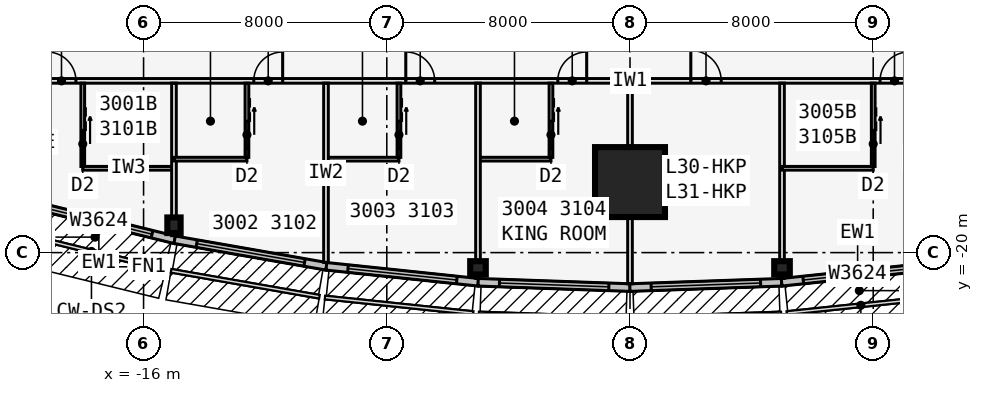
"""IFC4 building model, lengths in metres.
Left out: names, types, materials, properties, quantities, classifications, styles, units other than length and angle.
Written with IfcOpenShell. Run it as: python <this file> out.ifc"""

import sys

from ifc_helpers import new_model, si_unit, direction, frame, frame_2d, origin, origin_2d, place, context, subcontext, project, spatial, rectangle, i_section, extrude, element, fill, save


model = new_model("IFC4")
c1 = context("Model", 3, precision=1e-05, world=origin(), true_north=direction((0.0, 1.0)))
c2 = subcontext(c1, "Body", "Model", "MODEL_VIEW")
j1 = project(units=[si_unit("LENGTHUNIT", "METRE"), si_unit("PLANEANGLEUNIT", "RADIAN")], contexts=[c1])
p1 = place(None, origin())
s1 = spatial("IfcSite", under=j1, at=p1, CompositionType="ELEMENT")
p2 = place(p1, origin())
s2 = spatial("IfcBuilding", under=s1, at=p2, CompositionType="ELEMENT")
p3 = place(p2, frame((0.0, 0.0, 118.1)))
s3 = spatial("IfcBuildingStorey", under=s2, at=p3, CompositionType="ELEMENT", Elevation=118.1)
for number, where, z_axis, x_axis in (
    (1, (-15.0, -19.1, 0.0), (0.0, 0.0, 1.0), (1.0, 0.0, 0.0)),
    (2, (-5.0, -20.5, 0.0), (0.0, 0.0, 1.0), (0.0, -1.0, 0.0)),
    (3, (5.0, -20.5, 0.0), (0.0, 0.0, 1.0), (0.0, -1.0, 0.0)),
):
    element("IfcColumn", number, at=place(p3, frame(where, z_axis=z_axis, x_axis=x_axis)), inside=s3, PredefinedType="COLUMN", context=c2, shape_type="SweptSolid", body=[
        extrude(i_section(OverallWidth=0.437, OverallDepth=0.513, WebThickness=0.061, FlangeThickness=0.097, at=origin_2d()), origin(), (0.0, 0.0, 1.0), 3.4),
    ])
p4 = place(p3, frame((0.0, -17.68, 0.0), z_axis=(0.0, 0.0, 1.0), x_axis=(0.0, -1.0, 0.0)))
e4 = element("IfcColumn", 4, at=p4, inside=s3, PredefinedType="COLUMN", context=c2, shape_type="SweptSolid", body=[
    extrude(rectangle(XDim=2.3, YDim=2.3, at=origin_2d()), origin(), (0.0, 0.0, 1.0), 3.4),
])
p5 = place(p3, frame((-19.97, -18.354, 0.0), z_axis=(0.0, 0.0, 1.0), x_axis=(0.971270024053, -0.237980126011, 0.0)))
e5 = element("IfcWall", 5, at=p5, inside=s3, PredefinedType="STANDARD", context=c2, shape_type="SweptSolid", body=[
    extrude(rectangle(XDim=5.148, YDim=0.25, at=frame_2d((2.574, 0.0))), origin(), (0.0, 0.0, 1.0), 3.235),
])
p6 = place(p5, frame((0.774, 0.0, 0.45)))
e6 = element("IfcOpeningElement", 6, at=p6, cuts=e5, PredefinedType="OPENING", context=c2, shape_type="SweptSolid", body=[
    extrude(rectangle(XDim=3.6, YDim=2.4, at=frame_2d((1.8, 1.2))), frame((0.0, 0.135, 0.0), z_axis=(0.0, -1.0, 0.0), x_axis=(1.0, 0.0, 0.0)), (0.0, 0.0, 1.0), 0.27),
])
p7 = place(p3, frame((-14.979, -19.577, 0.0), z_axis=(0.0, 0.0, 1.0), x_axis=(0.985030467156, -0.172380331752, 0.0)))
e7 = element("IfcWall", 7, at=p7, inside=s3, PredefinedType="STANDARD", context=c2, shape_type="SweptSolid", body=[
    extrude(rectangle(XDim=5.076, YDim=0.25, at=frame_2d((2.538, 0.0))), origin(), (0.0, 0.0, 1.0), 3.235),
])
p8 = place(p7, frame((0.738, 0.0, 0.45)))
e8 = element("IfcOpeningElement", 8, at=p8, cuts=e7, PredefinedType="OPENING", context=c2, shape_type="SweptSolid", body=[
    extrude(rectangle(XDim=3.6, YDim=2.4, at=frame_2d((1.8, 1.2))), frame((0.0, 0.135, 0.0), z_axis=(0.0, -1.0, 0.0), x_axis=(1.0, 0.0, 0.0)), (0.0, 0.0, 1.0), 0.27),
])
p9 = place(p3, frame((-9.987, -20.451, 0.0), z_axis=(0.0, 0.0, 1.0), x_axis=(0.994534683851, -0.104406717299, 0.0)))
e9 = element("IfcWall", 9, at=p9, inside=s3, PredefinedType="STANDARD", context=c2, shape_type="SweptSolid", body=[
    extrude(rectangle(XDim=5.028, YDim=0.25, at=frame_2d((2.514, 0.0))), origin(), (0.0, 0.0, 1.0), 3.235),
])
p10 = place(p9, frame((0.714, 0.0, 0.45)))
e10 = element("IfcOpeningElement", 10, at=p10, cuts=e9, PredefinedType="OPENING", context=c2, shape_type="SweptSolid", body=[
    extrude(rectangle(XDim=3.6, YDim=2.4, at=frame_2d((1.8, 1.2))), frame((0.0, 0.135, 0.0), z_axis=(0.0, -1.0, 0.0), x_axis=(1.0, 0.0, 0.0)), (0.0, 0.0, 1.0), 0.27),
])
p11 = place(p3, frame((-4.996, -20.975, 0.0), z_axis=(0.0, 0.0, 1.0), x_axis=(0.999387720943, -0.034988329879, 0.0)))
e11 = element("IfcWall", 11, at=p11, inside=s3, PredefinedType="STANDARD", context=c2, shape_type="SweptSolid", body=[
    extrude(rectangle(XDim=5.003, YDim=0.25, at=frame_2d((2.501, 0.0))), origin(), (0.0, 0.0, 1.0), 3.235),
])
p12 = place(p11, frame((0.701, 0.0, 0.45)))
e12 = element("IfcOpeningElement", 12, at=p12, cuts=e11, PredefinedType="OPENING", context=c2, shape_type="SweptSolid", body=[
    extrude(rectangle(XDim=3.6, YDim=2.4, at=frame_2d((1.8, 1.2))), frame((0.0, 0.135, 0.0), z_axis=(0.0, -1.0, 0.0), x_axis=(1.0, 0.0, 0.0)), (0.0, 0.0, 1.0), 0.27),
])
p13 = place(p3, frame((-0.004, -21.15, 0.0), z_axis=(0.0, 0.0, 1.0), x_axis=(0.999387720943, 0.034988329879, 0.0)))
e13 = element("IfcWall", 13, at=p13, inside=s3, PredefinedType="STANDARD", context=c2, shape_type="SweptSolid", body=[
    extrude(rectangle(XDim=5.003, YDim=0.25, at=frame_2d((2.501, 0.0))), origin(), (0.0, 0.0, 1.0), 3.235),
])
p14 = place(p13, frame((0.701, 0.0, 0.45)))
e14 = element("IfcOpeningElement", 14, at=p14, cuts=e13, PredefinedType="OPENING", context=c2, shape_type="SweptSolid", body=[
    extrude(rectangle(XDim=3.6, YDim=2.4, at=frame_2d((1.8, 1.2))), frame((0.0, 0.135, 0.0), z_axis=(0.0, -1.0, 0.0), x_axis=(1.0, 0.0, 0.0)), (0.0, 0.0, 1.0), 0.27),
])
p15 = place(p3, frame((4.987, -20.976, 0.0), z_axis=(0.0, 0.0, 1.0), x_axis=(0.994534683851, 0.104406717299, 0.0)))
e15 = element("IfcWall", 15, at=p15, inside=s3, PredefinedType="STANDARD", context=c2, shape_type="SweptSolid", body=[
    extrude(rectangle(XDim=5.028, YDim=0.25, at=frame_2d((2.514, 0.0))), origin(), (0.0, 0.0, 1.0), 3.235),
])
p16 = place(p15, frame((0.714, 0.0, 0.45)))
e16 = element("IfcOpeningElement", 16, at=p16, cuts=e15, PredefinedType="OPENING", context=c2, shape_type="SweptSolid", body=[
    extrude(rectangle(XDim=3.6, YDim=2.4, at=frame_2d((1.8, 1.2))), frame((0.0, 0.135, 0.0), z_axis=(0.0, -1.0, 0.0), x_axis=(1.0, 0.0, 0.0)), (0.0, 0.0, 1.0), 0.27),
])
p17 = place(p3, frame((-23.857, -14.351, 0.0), z_axis=(0.0, 0.0, 1.0), x_axis=(1.0, 0.0, 0.0)))
e17 = element("IfcWall", 17, at=p17, inside=s3, PredefinedType="PARTITIONING", context=c2, shape_type="SweptSolid", body=[
    extrude(rectangle(XDim=47.714, YDim=0.15, at=frame_2d((23.857, 0.0))), origin(), (0.0, 0.0, 1.0), 3.235),
])
p18 = place(p17, frame((4.682, 0.0, 0.0)))
e18 = element("IfcOpeningElement", 18, at=p18, cuts=e17, PredefinedType="OPENING", context=c2, shape_type="SweptSolid", body=[
    extrude(rectangle(XDim=0.95, YDim=2.13, at=frame_2d((0.475, 1.065))), frame((0.0, 0.085, 0.0), z_axis=(0.0, -1.0, 0.0), x_axis=(1.0, 0.0, 0.0)), (0.0, 0.0, 1.0), 0.17),
])
p19 = place(p17, frame((11.482, 0.0, 0.0)))
e19 = element("IfcOpeningElement", 19, at=p19, cuts=e17, PredefinedType="OPENING", context=c2, shape_type="SweptSolid", body=[
    extrude(rectangle(XDim=0.95, YDim=2.13, at=frame_2d((0.475, 1.065))), frame((0.0, 0.085, 0.0), z_axis=(0.0, -1.0, 0.0), x_axis=(1.0, 0.0, 0.0)), (0.0, 0.0, 1.0), 0.17),
])
p20 = place(p17, frame((16.482, 0.0, 0.0)))
e20 = element("IfcOpeningElement", 20, at=p20, cuts=e17, PredefinedType="OPENING", context=c2, shape_type="SweptSolid", body=[
    extrude(rectangle(XDim=0.95, YDim=2.13, at=frame_2d((0.475, 1.065))), frame((0.0, 0.085, 0.0), z_axis=(0.0, -1.0, 0.0), x_axis=(1.0, 0.0, 0.0)), (0.0, 0.0, 1.0), 0.17),
])
p21 = place(p17, frame((21.482, 0.0, 0.0)))
e21 = element("IfcOpeningElement", 21, at=p21, cuts=e17, PredefinedType="OPENING", context=c2, shape_type="SweptSolid", body=[
    extrude(rectangle(XDim=0.95, YDim=2.13, at=frame_2d((0.475, 1.065))), frame((0.0, 0.085, 0.0), z_axis=(0.0, -1.0, 0.0), x_axis=(1.0, 0.0, 0.0)), (0.0, 0.0, 1.0), 0.17),
])
p22 = place(p17, frame((25.857, 0.0, 0.0)))
e22 = element("IfcOpeningElement", 22, at=p22, cuts=e17, PredefinedType="OPENING", context=c2, shape_type="SweptSolid", body=[
    extrude(rectangle(XDim=1.0, YDim=2.13, at=frame_2d((0.5, 1.065))), frame((0.0, 0.085, 0.0), z_axis=(0.0, -1.0, 0.0), x_axis=(1.0, 0.0, 0.0)), (0.0, 0.0, 1.0), 0.17),
])
p23 = place(p17, frame((32.082, 0.0, 0.0)))
e23 = element("IfcOpeningElement", 23, at=p23, cuts=e17, PredefinedType="OPENING", context=c2, shape_type="SweptSolid", body=[
    extrude(rectangle(XDim=0.95, YDim=2.13, at=frame_2d((0.475, 1.065))), frame((0.0, 0.085, 0.0), z_axis=(0.0, -1.0, 0.0), x_axis=(1.0, 0.0, 0.0)), (0.0, 0.0, 1.0), 0.17),
])
p24 = place(p17, frame((42.082, 0.0, 0.0)))
e24 = element("IfcOpeningElement", 24, at=p24, cuts=e17, PredefinedType="OPENING", context=c2, shape_type="SweptSolid", body=[
    extrude(rectangle(XDim=0.95, YDim=2.13, at=frame_2d((0.475, 1.065))), frame((0.0, 0.085, 0.0), z_axis=(0.0, -1.0, 0.0), x_axis=(1.0, 0.0, 0.0)), (0.0, 0.0, 1.0), 0.17),
])
p25 = place(p3, frame((-15.0, -14.426, 0.0), z_axis=(0.0, 0.0, 1.0), x_axis=(0.0, -1.0, 0.0)))
e25 = element("IfcWall", 25, at=p25, inside=s3, PredefinedType="PARTITIONING", context=c2, shape_type="SweptSolid", body=[
    extrude(rectangle(XDim=5.017, YDim=0.15, at=frame_2d((2.508, 0.0))), origin(), (0.0, 0.0, 1.0), 2.389),
])
p26 = place(p3, frame((-10.0, -14.426, 0.0), z_axis=(0.0, 0.0, 1.0), x_axis=(0.0, -1.0, 0.0)))
e26 = element("IfcWall", 26, at=p26, inside=s3, PredefinedType="PARTITIONING", context=c2, shape_type="SweptSolid", body=[
    extrude(rectangle(XDim=5.895, YDim=0.15, at=frame_2d((2.948, 0.0))), origin(), (0.0, 0.0, 1.0), 2.389),
])
p27 = place(p3, frame((-5.0, -14.426, 0.0), z_axis=(0.0, 0.0, 1.0), x_axis=(0.0, -1.0, 0.0)))
e27 = element("IfcWall", 27, at=p27, inside=s3, PredefinedType="PARTITIONING", context=c2, shape_type="SweptSolid", body=[
    extrude(rectangle(XDim=6.423, YDim=0.15, at=frame_2d((3.211, 0.0))), origin(), (0.0, 0.0, 1.0), 2.389),
])
p28 = place(p3, frame((0.0, -14.426, 0.0), z_axis=(0.0, 0.0, 1.0), x_axis=(0.0, -1.0, 0.0)))
e28 = element("IfcWall", 28, at=p28, inside=s3, PredefinedType="PARTITIONING", context=c2, shape_type="SweptSolid", body=[
    extrude(rectangle(XDim=6.599, YDim=0.15, at=frame_2d((3.299, 0.0))), origin(), (0.0, 0.0, 1.0), 2.389),
])
p29 = place(p3, frame((5.0, -14.426, 0.0), z_axis=(0.0, 0.0, 1.0), x_axis=(0.0, -1.0, 0.0)))
e29 = element("IfcWall", 29, at=p29, inside=s3, PredefinedType="PARTITIONING", context=c2, shape_type="SweptSolid", body=[
    extrude(rectangle(XDim=6.423, YDim=0.15, at=frame_2d((3.211, 0.0))), origin(), (0.0, 0.0, 1.0), 2.389),
])
p30 = place(p3, frame((-18.0, -17.226, 0.0), z_axis=(0.0, 0.0, 1.0), x_axis=(1.0, 0.0, 0.0)))
e30 = element("IfcWall", 30, at=p30, inside=s3, PredefinedType="PLUMBINGWALL", context=c2, shape_type="SweptSolid", body=[
    extrude(rectangle(XDim=3.0, YDim=0.12, at=frame_2d((1.5, 0.0))), origin(), (0.0, 0.0, 1.0), 3.235),
])
p31 = place(p3, frame((-18.0, -14.426, 0.0), z_axis=(0.0, 0.0, 1.0), x_axis=(0.0, -1.0, 0.0)))
e31 = element("IfcWall", 31, at=p31, inside=s3, PredefinedType="PLUMBINGWALL", context=c2, shape_type="SweptSolid", body=[
    extrude(rectangle(XDim=2.74, YDim=0.12, at=frame_2d((1.37, 0.0))), origin(), (0.0, 0.0, 1.0), 3.235),
])
p32 = place(p31, frame((1.55, 0.0, 0.0)))
e32 = element("IfcOpeningElement", 32, at=p32, cuts=e31, PredefinedType="OPENING", context=c2, shape_type="SweptSolid", body=[
    extrude(rectangle(XDim=0.9, YDim=2.13, at=frame_2d((0.45, 1.065))), frame((0.0, 0.07, 0.0), z_axis=(0.0, -1.0, 0.0), x_axis=(1.0, 0.0, 0.0)), (0.0, 0.0, 1.0), 0.14),
])
p33 = place(p3, frame((-15.0, -16.926, 0.0), z_axis=(0.0, 0.0, 1.0), x_axis=(1.0, 0.0, 0.0)))
e33 = element("IfcWall", 33, at=p33, inside=s3, PredefinedType="PLUMBINGWALL", context=c2, shape_type="SweptSolid", body=[
    extrude(rectangle(XDim=2.4, YDim=0.12, at=frame_2d((1.2, 0.0))), origin(), (0.0, 0.0, 1.0), 3.235),
])
p34 = place(p3, frame((-12.6, -14.426, 0.0), z_axis=(0.0, 0.0, 1.0), x_axis=(0.0, -1.0, 0.0)))
e34 = element("IfcWall", 34, at=p34, inside=s3, PredefinedType="PLUMBINGWALL", context=c2, shape_type="SweptSolid", body=[
    extrude(rectangle(XDim=2.44, YDim=0.12, at=frame_2d((1.22, 0.0))), origin(), (0.0, 0.0, 1.0), 3.235),
])
p35 = place(p34, frame((1.25, 0.0, 0.0)))
e35 = element("IfcOpeningElement", 35, at=p35, cuts=e34, PredefinedType="OPENING", context=c2, shape_type="SweptSolid", body=[
    extrude(rectangle(XDim=0.9, YDim=2.13, at=frame_2d((0.45, 1.065))), frame((0.0, 0.07, 0.0), z_axis=(0.0, -1.0, 0.0), x_axis=(1.0, 0.0, 0.0)), (0.0, 0.0, 1.0), 0.14),
])
p36 = place(p3, frame((-10.0, -16.926, 0.0), z_axis=(0.0, 0.0, 1.0), x_axis=(1.0, 0.0, 0.0)))
e36 = element("IfcWall", 36, at=p36, inside=s3, PredefinedType="PLUMBINGWALL", context=c2, shape_type="SweptSolid", body=[
    extrude(rectangle(XDim=2.4, YDim=0.12, at=frame_2d((1.2, 0.0))), origin(), (0.0, 0.0, 1.0), 3.235),
])
p37 = place(p3, frame((-7.6, -14.426, 0.0), z_axis=(0.0, 0.0, 1.0), x_axis=(0.0, -1.0, 0.0)))
e37 = element("IfcWall", 37, at=p37, inside=s3, PredefinedType="PLUMBINGWALL", context=c2, shape_type="SweptSolid", body=[
    extrude(rectangle(XDim=2.44, YDim=0.12, at=frame_2d((1.22, 0.0))), origin(), (0.0, 0.0, 1.0), 3.235),
])
p38 = place(p37, frame((1.25, 0.0, 0.0)))
e38 = element("IfcOpeningElement", 38, at=p38, cuts=e37, PredefinedType="OPENING", context=c2, shape_type="SweptSolid", body=[
    extrude(rectangle(XDim=0.9, YDim=2.13, at=frame_2d((0.45, 1.065))), frame((0.0, 0.07, 0.0), z_axis=(0.0, -1.0, 0.0), x_axis=(1.0, 0.0, 0.0)), (0.0, 0.0, 1.0), 0.14),
])
p39 = place(p3, frame((-5.0, -16.926, 0.0), z_axis=(0.0, 0.0, 1.0), x_axis=(1.0, 0.0, 0.0)))
e39 = element("IfcWall", 39, at=p39, inside=s3, PredefinedType="PLUMBINGWALL", context=c2, shape_type="SweptSolid", body=[
    extrude(rectangle(XDim=2.4, YDim=0.12, at=frame_2d((1.2, 0.0))), origin(), (0.0, 0.0, 1.0), 3.235),
])
p40 = place(p3, frame((-2.6, -14.426, 0.0), z_axis=(0.0, 0.0, 1.0), x_axis=(0.0, -1.0, 0.0)))
e40 = element("IfcWall", 40, at=p40, inside=s3, PredefinedType="PLUMBINGWALL", context=c2, shape_type="SweptSolid", body=[
    extrude(rectangle(XDim=2.44, YDim=0.12, at=frame_2d((1.22, 0.0))), origin(), (0.0, 0.0, 1.0), 3.235),
])
p41 = place(p40, frame((1.25, 0.0, 0.0)))
e41 = element("IfcOpeningElement", 41, at=p41, cuts=e40, PredefinedType="OPENING", context=c2, shape_type="SweptSolid", body=[
    extrude(rectangle(XDim=0.9, YDim=2.13, at=frame_2d((0.45, 1.065))), frame((0.0, 0.07, 0.0), z_axis=(0.0, -1.0, 0.0), x_axis=(1.0, 0.0, 0.0)), (0.0, 0.0, 1.0), 0.14),
])
p42 = place(p3, frame((5.0, -17.226, 0.0), z_axis=(0.0, 0.0, 1.0), x_axis=(1.0, 0.0, 0.0)))
e42 = element("IfcWall", 42, at=p42, inside=s3, PredefinedType="PLUMBINGWALL", context=c2, shape_type="SweptSolid", body=[
    extrude(rectangle(XDim=3.0, YDim=0.12, at=frame_2d((1.5, 0.0))), origin(), (0.0, 0.0, 1.0), 3.235),
])
p43 = place(p3, frame((8.0, -14.426, 0.0), z_axis=(0.0, 0.0, 1.0), x_axis=(0.0, -1.0, 0.0)))
e43 = element("IfcWall", 43, at=p43, inside=s3, PredefinedType="PLUMBINGWALL", context=c2, shape_type="SweptSolid", body=[
    extrude(rectangle(XDim=2.74, YDim=0.12, at=frame_2d((1.37, 0.0))), origin(), (0.0, 0.0, 1.0), 3.235),
])
p44 = place(p43, frame((1.55, 0.0, 0.0)))
e44 = element("IfcOpeningElement", 44, at=p44, cuts=e43, PredefinedType="OPENING", context=c2, shape_type="SweptSolid", body=[
    extrude(rectangle(XDim=0.9, YDim=2.13, at=frame_2d((0.45, 1.065))), frame((0.0, 0.07, 0.0), z_axis=(0.0, -1.0, 0.0), x_axis=(1.0, 0.0, 0.0)), (0.0, 0.0, 1.0), 0.14),
])
p45 = place(p6, origin())
e45 = element("IfcWindow", 45, at=p45, inside=s3, PartitioningType="SINGLE_PANEL", PredefinedType="WINDOW", context=c2, shape_type="SweptSolid", body=[
    extrude(rectangle(XDim=3.6, YDim=2.4, at=frame_2d((1.8, 1.2))), frame((0.0, 0.03, 0.0), z_axis=(0.0, -1.0, 0.0), x_axis=(1.0, 0.0, 0.0)), (0.0, 0.0, 1.0), 0.06),
])
fill(e6, e45)
p46 = place(p8, origin())
e46 = element("IfcWindow", 46, at=p46, inside=s3, PartitioningType="SINGLE_PANEL", PredefinedType="WINDOW", context=c2, shape_type="SweptSolid", body=[
    extrude(rectangle(XDim=3.6, YDim=2.4, at=frame_2d((1.8, 1.2))), frame((0.0, 0.03, 0.0), z_axis=(0.0, -1.0, 0.0), x_axis=(1.0, 0.0, 0.0)), (0.0, 0.0, 1.0), 0.06),
])
fill(e8, e46)
p47 = place(p10, origin())
e47 = element("IfcWindow", 47, at=p47, inside=s3, PartitioningType="SINGLE_PANEL", PredefinedType="WINDOW", context=c2, shape_type="SweptSolid", body=[
    extrude(rectangle(XDim=3.6, YDim=2.4, at=frame_2d((1.8, 1.2))), frame((0.0, 0.03, 0.0), z_axis=(0.0, -1.0, 0.0), x_axis=(1.0, 0.0, 0.0)), (0.0, 0.0, 1.0), 0.06),
])
fill(e10, e47)
p48 = place(p12, origin())
e48 = element("IfcWindow", 48, at=p48, inside=s3, PartitioningType="SINGLE_PANEL", PredefinedType="WINDOW", context=c2, shape_type="SweptSolid", body=[
    extrude(rectangle(XDim=3.6, YDim=2.4, at=frame_2d((1.8, 1.2))), frame((0.0, 0.03, 0.0), z_axis=(0.0, -1.0, 0.0), x_axis=(1.0, 0.0, 0.0)), (0.0, 0.0, 1.0), 0.06),
])
fill(e12, e48)
p49 = place(p14, origin())
e49 = element("IfcWindow", 49, at=p49, inside=s3, PartitioningType="SINGLE_PANEL", PredefinedType="WINDOW", context=c2, shape_type="SweptSolid", body=[
    extrude(rectangle(XDim=3.6, YDim=2.4, at=frame_2d((1.8, 1.2))), frame((0.0, 0.03, 0.0), z_axis=(0.0, -1.0, 0.0), x_axis=(1.0, 0.0, 0.0)), (0.0, 0.0, 1.0), 0.06),
])
fill(e14, e49)
p50 = place(p16, origin())
e50 = element("IfcWindow", 50, at=p50, inside=s3, PartitioningType="SINGLE_PANEL", PredefinedType="WINDOW", context=c2, shape_type="SweptSolid", body=[
    extrude(rectangle(XDim=3.6, YDim=2.4, at=frame_2d((1.8, 1.2))), frame((0.0, 0.03, 0.0), z_axis=(0.0, -1.0, 0.0), x_axis=(1.0, 0.0, 0.0)), (0.0, 0.0, 1.0), 0.06),
])
fill(e16, e50)
p51 = place(p32, origin())
e51 = element("IfcDoor", 51, at=p51, inside=s3, OperationType="SLIDING_TO_LEFT", PredefinedType="DOOR", context=c2, shape_type="SweptSolid", body=[
    extrude(rectangle(XDim=0.9, YDim=2.13, at=frame_2d((0.45, 1.065))), frame((0.0, 0.025, 0.0), z_axis=(0.0, -1.0, 0.0), x_axis=(1.0, 0.0, 0.0)), (0.0, 0.0, 1.0), 0.05),
])
fill(e32, e51)
p52 = place(p18, origin())
e52 = element("IfcDoor", 52, at=p52, inside=s3, OperationType="SINGLE_SWING_LEFT", PredefinedType="DOOR", context=c2, shape_type="SweptSolid", body=[
    extrude(rectangle(XDim=0.95, YDim=2.13, at=frame_2d((0.475, 1.065))), frame((0.0, 0.025, 0.0), z_axis=(0.0, -1.0, 0.0), x_axis=(1.0, 0.0, 0.0)), (0.0, 0.0, 1.0), 0.05),
])
fill(e18, e52)
p53 = place(p35, origin())
e53 = element("IfcDoor", 53, at=p53, inside=s3, OperationType="SLIDING_TO_LEFT", PredefinedType="DOOR", context=c2, shape_type="SweptSolid", body=[
    extrude(rectangle(XDim=0.9, YDim=2.13, at=frame_2d((0.45, 1.065))), frame((0.0, 0.025, 0.0), z_axis=(0.0, -1.0, 0.0), x_axis=(1.0, 0.0, 0.0)), (0.0, 0.0, 1.0), 0.05),
])
fill(e35, e53)
p54 = place(p19, origin())
e54 = element("IfcDoor", 54, at=p54, inside=s3, OperationType="SINGLE_SWING_RIGHT", PredefinedType="DOOR", context=c2, shape_type="SweptSolid", body=[
    extrude(rectangle(XDim=0.95, YDim=2.13, at=frame_2d((0.475, 1.065))), frame((0.0, 0.025, 0.0), z_axis=(0.0, -1.0, 0.0), x_axis=(1.0, 0.0, 0.0)), (0.0, 0.0, 1.0), 0.05),
])
fill(e19, e54)
p55 = place(p38, origin())
e55 = element("IfcDoor", 55, at=p55, inside=s3, OperationType="SLIDING_TO_LEFT", PredefinedType="DOOR", context=c2, shape_type="SweptSolid", body=[
    extrude(rectangle(XDim=0.9, YDim=2.13, at=frame_2d((0.45, 1.065))), frame((0.0, 0.025, 0.0), z_axis=(0.0, -1.0, 0.0), x_axis=(1.0, 0.0, 0.0)), (0.0, 0.0, 1.0), 0.05),
])
fill(e38, e55)
p56 = place(p20, origin())
e56 = element("IfcDoor", 56, at=p56, inside=s3, OperationType="SINGLE_SWING_LEFT", PredefinedType="DOOR", context=c2, shape_type="SweptSolid", body=[
    extrude(rectangle(XDim=0.95, YDim=2.13, at=frame_2d((0.475, 1.065))), frame((0.0, 0.025, 0.0), z_axis=(0.0, -1.0, 0.0), x_axis=(1.0, 0.0, 0.0)), (0.0, 0.0, 1.0), 0.05),
])
fill(e20, e56)
p57 = place(p41, origin())
e57 = element("IfcDoor", 57, at=p57, inside=s3, OperationType="SLIDING_TO_LEFT", PredefinedType="DOOR", context=c2, shape_type="SweptSolid", body=[
    extrude(rectangle(XDim=0.9, YDim=2.13, at=frame_2d((0.45, 1.065))), frame((0.0, 0.025, 0.0), z_axis=(0.0, -1.0, 0.0), x_axis=(1.0, 0.0, 0.0)), (0.0, 0.0, 1.0), 0.05),
])
fill(e41, e57)
p58 = place(p21, origin())
e58 = element("IfcDoor", 58, at=p58, inside=s3, OperationType="SINGLE_SWING_RIGHT", PredefinedType="DOOR", context=c2, shape_type="SweptSolid", body=[
    extrude(rectangle(XDim=0.95, YDim=2.13, at=frame_2d((0.475, 1.065))), frame((0.0, 0.025, 0.0), z_axis=(0.0, -1.0, 0.0), x_axis=(1.0, 0.0, 0.0)), (0.0, 0.0, 1.0), 0.05),
])
fill(e21, e58)
p59 = place(p22, origin())
e59 = element("IfcDoor", 59, at=p59, inside=s3, OperationType="SINGLE_SWING_LEFT", PredefinedType="DOOR", context=c2, shape_type="SweptSolid", body=[
    extrude(rectangle(XDim=1.0, YDim=2.13, at=frame_2d((0.5, 1.065))), frame((0.0, 0.025, 0.0), z_axis=(0.0, -1.0, 0.0), x_axis=(1.0, 0.0, 0.0)), (0.0, 0.0, 1.0), 0.05),
])
fill(e22, e59)
p60 = place(p44, origin())
e60 = element("IfcDoor", 60, at=p60, inside=s3, OperationType="SLIDING_TO_LEFT", PredefinedType="DOOR", context=c2, shape_type="SweptSolid", body=[
    extrude(rectangle(XDim=0.9, YDim=2.13, at=frame_2d((0.45, 1.065))), frame((0.0, 0.025, 0.0), z_axis=(0.0, -1.0, 0.0), x_axis=(1.0, 0.0, 0.0)), (0.0, 0.0, 1.0), 0.05),
])
fill(e44, e60)
p61 = place(p23, origin())
e61 = element("IfcDoor", 61, at=p61, inside=s3, OperationType="SINGLE_SWING_RIGHT", PredefinedType="DOOR", context=c2, shape_type="SweptSolid", body=[
    extrude(rectangle(XDim=0.95, YDim=2.13, at=frame_2d((0.475, 1.065))), frame((0.0, 0.025, 0.0), z_axis=(0.0, -1.0, 0.0), x_axis=(1.0, 0.0, 0.0)), (0.0, 0.0, 1.0), 0.05),
])
fill(e23, e61)
save(model, sys.argv[1])
